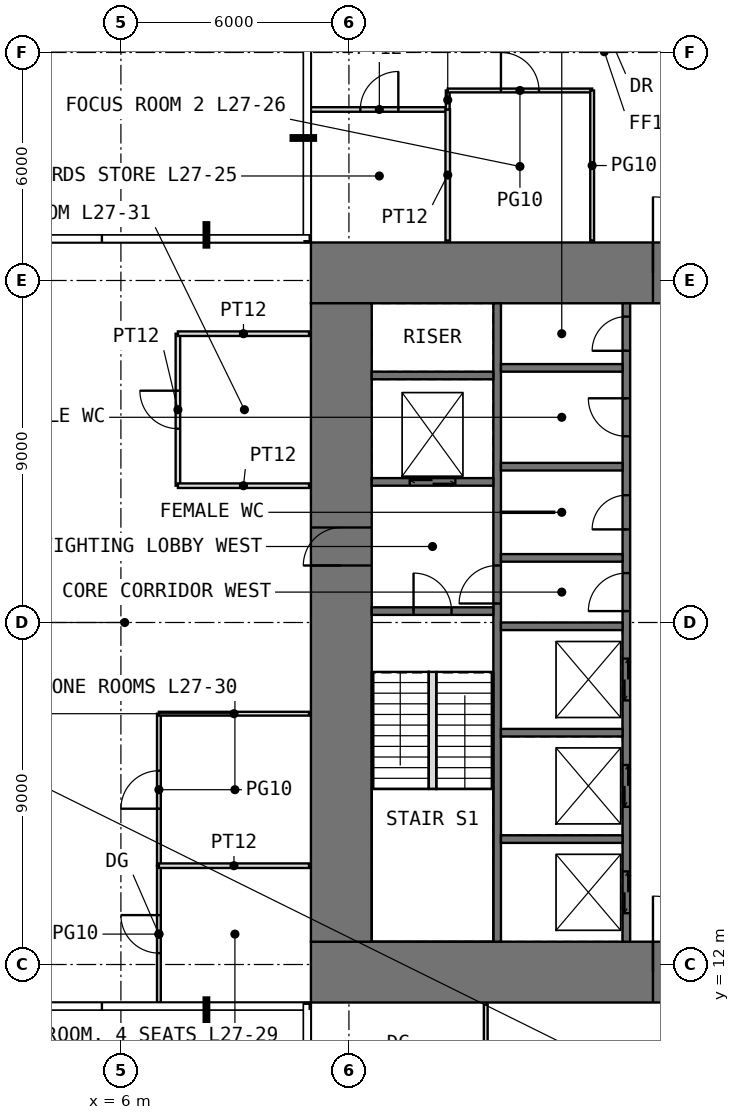
"""IFC4 building model, lengths in metres.
Left out: names, types, materials, properties, quantities, classifications, styles, units other than length and angle.
Written with IfcOpenShell. Run it as: python <this file> out.ifc"""

import sys

from ifc_helpers import new_model, si_unit, direction, frame, frame_2d, origin, place, context, subcontext, project, spatial, rectangle, extrude, element, fill, save


model = new_model("IFC4")
c1 = context("Model", 3, precision=1e-05, world=origin(), true_north=direction((0.0, 1.0)))
c2 = subcontext(c1, "Body", "Model", "MODEL_VIEW")
j1 = project(units=[si_unit("LENGTHUNIT", "METRE"), si_unit("PLANEANGLEUNIT", "RADIAN")], contexts=[c1])
p1 = place(None, origin())
s1 = spatial("IfcSite", under=j1, at=p1, CompositionType="ELEMENT")
p2 = place(p1, origin())
s2 = spatial("IfcBuilding", under=s1, at=p2, CompositionType="ELEMENT")
p3 = place(p2, frame((0.0, 0.0, 116.5)))
s3 = spatial("IfcBuildingStorey", under=s2, at=p3, CompositionType="ELEMENT", Elevation=116.5)
p4 = place(p3, frame((11.0, 11.8, -0.05), z_axis=(0.0, 0.0, 1.0), x_axis=(1.0, 0.0, 0.0)))
e1 = element("IfcWall", 1, at=p4, inside=s3, PredefinedType="SHEAR", context=c2, shape_type="SweptSolid", body=[
    extrude(rectangle(XDim=20.0, YDim=1.6, at=frame_2d((10.0, 0.0))), origin(), (0.0, 0.0, 1.0), 4.0),
])
p5 = place(p4, frame((9.0, 0.0, 0.05)))
e2 = element("IfcOpeningElement", 2, at=p5, cuts=e1, PredefinedType="OPENING", context=c2, shape_type="SweptSolid", body=[
    extrude(rectangle(XDim=2.0, YDim=2.2, at=frame_2d((1.0, 1.1))), frame((0.0, 0.81, 0.0), z_axis=(0.0, -1.0, 0.0), x_axis=(1.0, 0.0, 0.0)), (0.0, 0.0, 1.0), 1.62),
])
p6 = place(p3, frame((11.0, 30.2, -0.05), z_axis=(0.0, 0.0, 1.0), x_axis=(1.0, 0.0, 0.0)))
e3 = element("IfcWall", 3, at=p6, inside=s3, PredefinedType="SHEAR", context=c2, shape_type="SweptSolid", body=[
    extrude(rectangle(XDim=20.0, YDim=1.6, at=frame_2d((10.0, 0.0))), origin(), (0.0, 0.0, 1.0), 4.0),
])
p7 = place(p6, frame((9.0, 0.0, 0.05)))
e4 = element("IfcOpeningElement", 4, at=p7, cuts=e3, PredefinedType="OPENING", context=c2, shape_type="SweptSolid", body=[
    extrude(rectangle(XDim=2.0, YDim=2.2, at=frame_2d((1.0, 1.1))), frame((0.0, 0.81, 0.0), z_axis=(0.0, -1.0, 0.0), x_axis=(1.0, 0.0, 0.0)), (0.0, 0.0, 1.0), 1.62),
])
p8 = place(p3, frame((11.8, 12.6, -0.05), z_axis=(0.0, 0.0, 1.0), x_axis=(0.0, 1.0, 0.0)))
e5 = element("IfcWall", 5, at=p8, inside=s3, PredefinedType="SHEAR", context=c2, shape_type="SweptSolid", body=[
    extrude(rectangle(XDim=16.8, YDim=1.6, at=frame_2d((8.4, 0.0))), origin(), (0.0, 0.0, 1.0), 4.0),
])
p9 = place(p8, frame((9.9, 0.0, 0.05)))
e6 = element("IfcOpeningElement", 6, at=p9, cuts=e5, PredefinedType="OPENING", context=c2, shape_type="SweptSolid", body=[
    extrude(rectangle(XDim=1.0, YDim=2.2, at=frame_2d((0.5, 1.1))), frame((0.0, 0.81, 0.0), z_axis=(0.0, -1.0, 0.0), x_axis=(1.0, 0.0, 0.0)), (0.0, 0.0, 1.0), 1.62),
])
p10 = place(p3, frame((15.9, 12.6, -0.05), z_axis=(0.0, 0.0, 1.0), x_axis=(0.0, 1.0, 0.0)))
e7 = element("IfcWall", 7, at=p10, inside=s3, PredefinedType="SHEAR", context=c2, shape_type="SweptSolid", body=[
    extrude(rectangle(XDim=16.8, YDim=0.2, at=frame_2d((8.4, 0.0))), origin(), (0.0, 0.0, 1.0), 4.0),
])
p11 = place(p10, frame((8.9, 0.0, 0.05)))
e8 = element("IfcOpeningElement", 8, at=p11, cuts=e7, PredefinedType="OPENING", context=c2, shape_type="SweptSolid", body=[
    extrude(rectangle(XDim=1.0, YDim=2.2, at=frame_2d((0.5, 1.1))), frame((0.0, 0.11, 0.0), z_axis=(0.0, -1.0, 0.0), x_axis=(1.0, 0.0, 0.0)), (0.0, 0.0, 1.0), 0.22),
])
p12 = place(p3, frame((19.3, 12.6, -0.05), z_axis=(0.0, 0.0, 1.0), x_axis=(0.0, 1.0, 0.0)))
e9 = element("IfcWall", 9, at=p12, inside=s3, PredefinedType="SHEAR", context=c2, shape_type="SweptSolid", body=[
    extrude(rectangle(XDim=16.8, YDim=0.2, at=frame_2d((8.4, 0.0))), origin(), (0.0, 0.0, 1.0), 4.0),
])
p13 = place(p12, frame((8.7, 0.0, 0.05)))
e10 = element("IfcOpeningElement", 10, at=p13, cuts=e9, PredefinedType="OPENING", context=c2, shape_type="SweptSolid", body=[
    extrude(rectangle(XDim=1.0, YDim=2.2, at=frame_2d((0.5, 1.1))), frame((0.0, 0.11, 0.0), z_axis=(0.0, -1.0, 0.0), x_axis=(1.0, 0.0, 0.0)), (0.0, 0.0, 1.0), 0.22),
])
p14 = place(p12, frame((10.85, 0.0, 0.05)))
e11 = element("IfcOpeningElement", 11, at=p14, cuts=e9, PredefinedType="OPENING", context=c2, shape_type="SweptSolid", body=[
    extrude(rectangle(XDim=0.9, YDim=2.2, at=frame_2d((0.45, 1.1))), frame((0.0, 0.11, 0.0), z_axis=(0.0, -1.0, 0.0), x_axis=(1.0, 0.0, 0.0)), (0.0, 0.0, 1.0), 0.22),
])
p15 = place(p12, frame((13.3, 0.0, 0.05)))
e12 = element("IfcOpeningElement", 12, at=p15, cuts=e9, PredefinedType="OPENING", context=c2, shape_type="SweptSolid", body=[
    extrude(rectangle(XDim=1.0, YDim=2.2, at=frame_2d((0.5, 1.1))), frame((0.0, 0.11, 0.0), z_axis=(0.0, -1.0, 0.0), x_axis=(1.0, 0.0, 0.0)), (0.0, 0.0, 1.0), 0.22),
])
p16 = place(p12, frame((15.55, 0.0, 0.05)))
e13 = element("IfcOpeningElement", 13, at=p16, cuts=e9, PredefinedType="OPENING", context=c2, shape_type="SweptSolid", body=[
    extrude(rectangle(XDim=0.9, YDim=2.2, at=frame_2d((0.45, 1.1))), frame((0.0, 0.11, 0.0), z_axis=(0.0, -1.0, 0.0), x_axis=(1.0, 0.0, 0.0)), (0.0, 0.0, 1.0), 0.22),
])
p17 = place(p12, frame((0.75, 0.0, 0.05)))
e14 = element("IfcOpeningElement", 14, at=p17, cuts=e9, PredefinedType="OPENING", context=c2, shape_type="SweptSolid", body=[
    extrude(rectangle(XDim=1.1, YDim=2.2, at=frame_2d((0.55, 1.1))), frame((0.0, 0.11, 0.0), z_axis=(0.0, -1.0, 0.0), x_axis=(1.0, 0.0, 0.0)), (0.0, 0.0, 1.0), 0.22),
])
p18 = place(p12, frame((3.55, 0.0, 0.05)))
e15 = element("IfcOpeningElement", 15, at=p18, cuts=e9, PredefinedType="OPENING", context=c2, shape_type="SweptSolid", body=[
    extrude(rectangle(XDim=1.1, YDim=2.2, at=frame_2d((0.55, 1.1))), frame((0.0, 0.11, 0.0), z_axis=(0.0, -1.0, 0.0), x_axis=(1.0, 0.0, 0.0)), (0.0, 0.0, 1.0), 0.22),
])
p19 = place(p12, frame((6.35, 0.0, 0.05)))
e16 = element("IfcOpeningElement", 16, at=p19, cuts=e9, PredefinedType="OPENING", context=c2, shape_type="SweptSolid", body=[
    extrude(rectangle(XDim=1.1, YDim=2.2, at=frame_2d((0.55, 1.1))), frame((0.0, 0.11, 0.0), z_axis=(0.0, -1.0, 0.0), x_axis=(1.0, 0.0, 0.0)), (0.0, 0.0, 1.0), 0.22),
])
p20 = place(p3, frame((12.6, 21.3, -0.05), z_axis=(0.0, 0.0, 1.0), x_axis=(1.0, 0.0, 0.0)))
e17 = element("IfcWall", 17, at=p20, inside=s3, PredefinedType="SHEAR", context=c2, shape_type="SweptSolid", body=[
    extrude(rectangle(XDim=3.2, YDim=0.2, at=frame_2d((1.6, 0.0))), origin(), (0.0, 0.0, 1.0), 4.0),
])
p21 = place(p20, frame((1.1, 0.0, 0.05)))
e18 = element("IfcOpeningElement", 18, at=p21, cuts=e17, PredefinedType="OPENING", context=c2, shape_type="SweptSolid", body=[
    extrude(rectangle(XDim=1.0, YDim=2.2, at=frame_2d((0.5, 1.1))), frame((0.0, 0.11, 0.0), z_axis=(0.0, -1.0, 0.0), x_axis=(1.0, 0.0, 0.0)), (0.0, 0.0, 1.0), 0.22),
])
p22 = place(p3, frame((12.6, 24.7, -0.05), z_axis=(0.0, 0.0, 1.0), x_axis=(1.0, 0.0, 0.0)))
e19 = element("IfcWall", 19, at=p22, inside=s3, PredefinedType="SHEAR", context=c2, shape_type="SweptSolid", body=[
    extrude(rectangle(XDim=3.2, YDim=0.2, at=frame_2d((1.6, 0.0))), origin(), (0.0, 0.0, 1.0), 4.0),
])
p23 = place(p22, frame((1.0, 0.0, 0.05)))
e20 = element("IfcOpeningElement", 20, at=p23, cuts=e19, PredefinedType="OPENING", context=c2, shape_type="SweptSolid", body=[
    extrude(rectangle(XDim=1.2, YDim=2.2, at=frame_2d((0.6, 1.1))), frame((0.0, 0.11, 0.0), z_axis=(0.0, -1.0, 0.0), x_axis=(1.0, 0.0, 0.0)), (0.0, 0.0, 1.0), 0.22),
])
for number, where, z_axis, x_axis in (
    (21, (12.6, 27.5, -0.05), (0.0, 0.0, 1.0), (1.0, 0.0, 0.0)),
    (22, (16.0, 15.3, -0.05), (0.0, 0.0, 1.0), (1.0, 0.0, 0.0)),
    (23, (16.0, 18.1, -0.05), (0.0, 0.0, 1.0), (1.0, 0.0, 0.0)),
    (24, (16.0, 20.9, -0.05), (0.0, 0.0, 1.0), (1.0, 0.0, 0.0)),
    (25, (16.0, 22.7, -0.05), (0.0, 0.0, 1.0), (1.0, 0.0, 0.0)),
    (26, (16.0, 25.1, -0.05), (0.0, 0.0, 1.0), (1.0, 0.0, 0.0)),
    (27, (16.0, 27.7, -0.05), (0.0, 0.0, 1.0), (1.0, 0.0, 0.0)),
):
    element("IfcWall", number, at=place(p3, frame(where, z_axis=z_axis, x_axis=x_axis)), inside=s3, PredefinedType="SHEAR", context=c2, shape_type="SweptSolid", body=[
        extrude(rectangle(XDim=3.2, YDim=0.2, at=frame_2d((1.6, 0.0))), origin(), (0.0, 0.0, 1.0), 4.0),
    ])
p24 = place(p3, frame((16.0, 23.9, 0.0), z_axis=(0.0, 0.0, 1.0), x_axis=(1.0, 0.0, 0.0)))
e28 = element("IfcWall", 28, at=p24, inside=s3, PredefinedType="PARTITIONING", context=c2, shape_type="SweptSolid", body=[
    extrude(rectangle(XDim=1.4, YDim=0.03, at=frame_2d((0.7, 0.0))), origin(), (0.0, 0.0, 1.0), 3.75),
])
p25 = place(p3, frame((7.0, 11.0, 0.0), z_axis=(0.0, 0.0, 1.0), x_axis=(0.0, 1.0, 0.0)))
e29 = element("IfcWall", 29, at=p25, inside=s3, PredefinedType="PARTITIONING", context=c2, shape_type="SweptSolid", body=[
    extrude(rectangle(XDim=3.6, YDim=0.1, at=frame_2d((1.8, 0.0))), origin(), (0.0, 0.0, 1.0), 3.75),
])
p26 = place(p25, frame((1.3, 0.0, 0.0)))
e30 = element("IfcOpeningElement", 30, at=p26, cuts=e29, PredefinedType="OPENING", context=c2, shape_type="SweptSolid", body=[
    extrude(rectangle(XDim=1.0, YDim=2.4, at=frame_2d((0.5, 1.2))), frame((0.0, 0.06, 0.0), z_axis=(0.0, -1.0, 0.0), x_axis=(1.0, 0.0, 0.0)), (0.0, 0.0, 1.0), 0.12),
])
p27 = place(p3, frame((7.0, 14.6, 0.0), z_axis=(0.0, 0.0, 1.0), x_axis=(0.0, 1.0, 0.0)))
e31 = element("IfcWall", 31, at=p27, inside=s3, PredefinedType="PARTITIONING", context=c2, shape_type="SweptSolid", body=[
    extrude(rectangle(XDim=4.0, YDim=0.1, at=frame_2d((2.0, 0.0))), origin(), (0.0, 0.0, 1.0), 3.75),
])
p28 = place(p27, frame((1.5, 0.0, 0.0)))
e32 = element("IfcOpeningElement", 32, at=p28, cuts=e31, PredefinedType="OPENING", context=c2, shape_type="SweptSolid", body=[
    extrude(rectangle(XDim=1.0, YDim=2.4, at=frame_2d((0.5, 1.2))), frame((0.0, 0.06, 0.0), z_axis=(0.0, -1.0, 0.0), x_axis=(1.0, 0.0, 0.0)), (0.0, 0.0, 1.0), 0.12),
])
p29 = place(p3, frame((7.0, 14.6, 0.0), z_axis=(0.0, 0.0, 1.0), x_axis=(1.0, 0.0, 0.0)))
e33 = element("IfcWall", 33, at=p29, inside=s3, PredefinedType="PARTITIONING", context=c2, shape_type="SweptSolid", body=[
    extrude(rectangle(XDim=3.95, YDim=0.12, at=frame_2d((1.975, 0.0))), origin(), (0.0, 0.0, 1.0), 3.75),
])
p30 = place(p3, frame((7.0, 18.6, 0.0), z_axis=(0.0, 0.0, 1.0), x_axis=(1.0, 0.0, 0.0)))
e34 = element("IfcWall", 34, at=p30, inside=s3, PredefinedType="PARTITIONING", context=c2, shape_type="SweptSolid", body=[
    extrude(rectangle(XDim=3.95, YDim=0.1, at=frame_2d((1.975, 0.0))), origin(), (0.0, 0.0, 1.0), 3.75),
])
p31 = place(p3, frame((7.5, 24.6, 0.0), z_axis=(0.0, 0.0, 1.0), x_axis=(0.0, 1.0, 0.0)))
e35 = element("IfcWall", 35, at=p31, inside=s3, PredefinedType="PARTITIONING", context=c2, shape_type="SweptSolid", body=[
    extrude(rectangle(XDim=4.0, YDim=0.12, at=frame_2d((2.0, 0.0))), origin(), (0.0, 0.0, 1.0), 3.75),
])
p32 = place(p31, frame((1.5, 0.0, 0.0)))
e36 = element("IfcOpeningElement", 36, at=p32, cuts=e35, PredefinedType="OPENING", context=c2, shape_type="SweptSolid", body=[
    extrude(rectangle(XDim=1.0, YDim=2.2, at=frame_2d((0.5, 1.1))), frame((0.0, 0.07, 0.0), z_axis=(0.0, -1.0, 0.0), x_axis=(1.0, 0.0, 0.0)), (0.0, 0.0, 1.0), 0.14),
])
for number, where, z_axis, x_axis in (
    (37, (7.5, 24.6, 0.0), (0.0, 0.0, 1.0), (1.0, 0.0, 0.0)),
    (38, (7.5, 28.6, 0.0), (0.0, 0.0, 1.0), (1.0, 0.0, 0.0)),
):
    element("IfcWall", number, at=place(p3, frame(where, z_axis=z_axis, x_axis=x_axis)), inside=s3, PredefinedType="PARTITIONING", context=c2, shape_type="SweptSolid", body=[
        extrude(rectangle(XDim=3.45, YDim=0.12, at=frame_2d((1.725, 0.0))), origin(), (0.0, 0.0, 1.0), 3.75),
    ])
p33 = place(p3, frame((11.0, 34.5, 0.0), z_axis=(0.0, 0.0, 1.0), x_axis=(1.0, 0.0, 0.0)))
e39 = element("IfcWall", 39, at=p33, inside=s3, PredefinedType="PARTITIONING", context=c2, shape_type="SweptSolid", body=[
    extrude(rectangle(XDim=3.6, YDim=0.12, at=frame_2d((1.8, 0.0))), origin(), (0.0, 0.0, 1.0), 3.75),
])
p34 = place(p33, frame((1.3, 0.0, 0.0)))
e40 = element("IfcOpeningElement", 40, at=p34, cuts=e39, PredefinedType="OPENING", context=c2, shape_type="SweptSolid", body=[
    extrude(rectangle(XDim=1.0, YDim=2.2, at=frame_2d((0.5, 1.1))), frame((0.0, 0.07, 0.0), z_axis=(0.0, -1.0, 0.0), x_axis=(1.0, 0.0, 0.0)), (0.0, 0.0, 1.0), 0.14),
])
p35 = place(p3, frame((14.6, 31.05, 0.0), z_axis=(0.0, 0.0, 1.0), x_axis=(0.0, 1.0, 0.0)))
e41 = element("IfcWall", 41, at=p35, inside=s3, PredefinedType="PARTITIONING", context=c2, shape_type="SweptSolid", body=[
    extrude(rectangle(XDim=3.45, YDim=0.12, at=frame_2d((1.725, 0.0))), origin(), (0.0, 0.0, 1.0), 3.75),
])
p36 = place(p3, frame((14.6, 34.5, 0.0), z_axis=(0.0, 0.0, 1.0), x_axis=(0.0, 1.0, 0.0)))
e42 = element("IfcWall", 42, at=p36, inside=s3, PredefinedType="PARTITIONING", context=c2, shape_type="SweptSolid", body=[
    extrude(rectangle(XDim=0.5, YDim=0.1, at=frame_2d((0.25, 0.0))), origin(), (0.0, 0.0, 1.0), 3.75),
])
p37 = place(p3, frame((14.6, 35.0, 0.0), z_axis=(0.0, 0.0, 1.0), x_axis=(1.0, 0.0, 0.0)))
e43 = element("IfcWall", 43, at=p37, inside=s3, PredefinedType="PARTITIONING", context=c2, shape_type="SweptSolid", body=[
    extrude(rectangle(XDim=3.8, YDim=0.1, at=frame_2d((1.9, 0.0))), origin(), (0.0, 0.0, 1.0), 3.75),
])
p38 = place(p37, frame((1.4, 0.0, 0.0)))
e44 = element("IfcOpeningElement", 44, at=p38, cuts=e43, PredefinedType="OPENING", context=c2, shape_type="SweptSolid", body=[
    extrude(rectangle(XDim=1.0, YDim=2.4, at=frame_2d((0.5, 1.2))), frame((0.0, 0.06, 0.0), z_axis=(0.0, -1.0, 0.0), x_axis=(1.0, 0.0, 0.0)), (0.0, 0.0, 1.0), 0.12),
])
for number, where, z_axis, x_axis in (
    (45, (15.6, 7.0, 0.0), (0.0, 0.0, 1.0), (0.0, 1.0, 0.0)),
    (46, (18.4, 31.05, 0.0), (0.0, 0.0, 1.0), (0.0, 1.0, 0.0)),
):
    element("IfcWall", number, at=place(p3, frame(where, z_axis=z_axis, x_axis=x_axis)), inside=s3, PredefinedType="PARTITIONING", context=c2, shape_type="SweptSolid", body=[
        extrude(rectangle(XDim=3.95, YDim=0.1, at=frame_2d((1.975, 0.0))), origin(), (0.0, 0.0, 1.0), 3.75),
    ])
p39 = place(p3, frame((14.2, 16.62, 0.0), z_axis=(0.0, 0.0, 1.0), x_axis=(0.0, 1.0, 0.0)))
e47 = element("IfcWall", 47, at=p39, inside=s3, PredefinedType="PARTITIONING", context=c2, shape_type="SweptSolid", body=[
    extrude(rectangle(XDim=3.08, YDim=0.2, at=frame_2d((1.54, 0.0))), origin(), (0.0, 0.0, 1.0), 4.0),
])
p40 = place(p5, origin())
e48 = element("IfcDoor", 48, at=p40, inside=s3, OperationType="DOUBLE_DOOR_SINGLE_SWING", PredefinedType="DOOR", context=c2, shape_type="SweptSolid", body=[
    extrude(rectangle(XDim=2.0, YDim=2.2, at=frame_2d((1.0, 1.1))), frame((0.0, 0.025, 0.0), z_axis=(0.0, -1.0, 0.0), x_axis=(1.0, 0.0, 0.0)), (0.0, 0.0, 1.0), 0.05),
])
fill(e2, e48)
p41 = place(p7, origin())
e49 = element("IfcDoor", 49, at=p41, inside=s3, OperationType="DOUBLE_DOOR_SINGLE_SWING", PredefinedType="DOOR", context=c2, shape_type="SweptSolid", body=[
    extrude(rectangle(XDim=2.0, YDim=2.2, at=frame_2d((1.0, 1.1))), frame((0.0, 0.025, 0.0), z_axis=(0.0, -1.0, 0.0), x_axis=(1.0, 0.0, 0.0)), (0.0, 0.0, 1.0), 0.05),
])
fill(e4, e49)
p42 = place(p9, origin())
e50 = element("IfcDoor", 50, at=p42, inside=s3, OperationType="SINGLE_SWING_LEFT", PredefinedType="DOOR", context=c2, shape_type="SweptSolid", body=[
    extrude(rectangle(XDim=1.0, YDim=2.2, at=frame_2d((0.5, 1.1))), frame((0.0, 0.025, 0.0), z_axis=(0.0, -1.0, 0.0), x_axis=(1.0, 0.0, 0.0)), (0.0, 0.0, 1.0), 0.05),
])
fill(e6, e50)
p43 = place(p21, origin())
e51 = element("IfcDoor", 51, at=p43, inside=s3, OperationType="SINGLE_SWING_LEFT", PredefinedType="DOOR", context=c2, shape_type="SweptSolid", body=[
    extrude(rectangle(XDim=1.0, YDim=2.2, at=frame_2d((0.5, 1.1))), frame((0.0, 0.025, 0.0), z_axis=(0.0, -1.0, 0.0), x_axis=(1.0, 0.0, 0.0)), (0.0, 0.0, 1.0), 0.05),
])
fill(e18, e51)
p44 = place(p11, origin())
e52 = element("IfcDoor", 52, at=p44, inside=s3, OperationType="SINGLE_SWING_LEFT", PredefinedType="DOOR", context=c2, shape_type="SweptSolid", body=[
    extrude(rectangle(XDim=1.0, YDim=2.2, at=frame_2d((0.5, 1.1))), frame((0.0, 0.025, 0.0), z_axis=(0.0, -1.0, 0.0), x_axis=(1.0, 0.0, 0.0)), (0.0, 0.0, 1.0), 0.05),
])
fill(e8, e52)
p45 = place(p13, origin())
e53 = element("IfcDoor", 53, at=p45, inside=s3, OperationType="SINGLE_SWING_LEFT", PredefinedType="DOOR", context=c2, shape_type="SweptSolid", body=[
    extrude(rectangle(XDim=1.0, YDim=2.2, at=frame_2d((0.5, 1.1))), frame((0.0, 0.025, 0.0), z_axis=(0.0, -1.0, 0.0), x_axis=(1.0, 0.0, 0.0)), (0.0, 0.0, 1.0), 0.05),
])
fill(e10, e53)
p46 = place(p14, origin())
e54 = element("IfcDoor", 54, at=p46, inside=s3, OperationType="SINGLE_SWING_LEFT", PredefinedType="DOOR", context=c2, shape_type="SweptSolid", body=[
    extrude(rectangle(XDim=0.9, YDim=2.2, at=frame_2d((0.45, 1.1))), frame((0.0, 0.025, 0.0), z_axis=(0.0, -1.0, 0.0), x_axis=(1.0, 0.0, 0.0)), (0.0, 0.0, 1.0), 0.05),
])
fill(e11, e54)
p47 = place(p15, origin())
e55 = element("IfcDoor", 55, at=p47, inside=s3, OperationType="SINGLE_SWING_RIGHT", PredefinedType="DOOR", context=c2, shape_type="SweptSolid", body=[
    extrude(rectangle(XDim=1.0, YDim=2.2, at=frame_2d((0.5, 1.1))), frame((0.0, 0.025, 0.0), z_axis=(0.0, -1.0, 0.0), x_axis=(1.0, 0.0, 0.0)), (0.0, 0.0, 1.0), 0.05),
])
fill(e12, e55)
p48 = place(p16, origin())
e56 = element("IfcDoor", 56, at=p48, inside=s3, OperationType="SINGLE_SWING_LEFT", PredefinedType="DOOR", context=c2, shape_type="SweptSolid", body=[
    extrude(rectangle(XDim=0.9, YDim=2.2, at=frame_2d((0.45, 1.1))), frame((0.0, 0.025, 0.0), z_axis=(0.0, -1.0, 0.0), x_axis=(1.0, 0.0, 0.0)), (0.0, 0.0, 1.0), 0.05),
])
fill(e13, e56)
p49 = place(p34, origin())
e57 = element("IfcDoor", 57, at=p49, inside=s3, OperationType="SINGLE_SWING_RIGHT", PredefinedType="DOOR", context=c2, shape_type="SweptSolid", body=[
    extrude(rectangle(XDim=1.0, YDim=2.2, at=frame_2d((0.5, 1.1))), frame((0.0, 0.025, 0.0), z_axis=(0.0, -1.0, 0.0), x_axis=(1.0, 0.0, 0.0)), (0.0, 0.0, 1.0), 0.05),
])
fill(e40, e57)
p50 = place(p38, origin())
e58 = element("IfcDoor", 58, at=p50, inside=s3, OperationType="SINGLE_SWING_LEFT", PredefinedType="DOOR", context=c2, shape_type="SweptSolid", body=[
    extrude(rectangle(XDim=1.0, YDim=2.4, at=frame_2d((0.5, 1.2))), frame((0.0, 0.025, 0.0), z_axis=(0.0, -1.0, 0.0), x_axis=(1.0, 0.0, 0.0)), (0.0, 0.0, 1.0), 0.05),
])
fill(e44, e58)
p51 = place(p26, origin())
e59 = element("IfcDoor", 59, at=p51, inside=s3, OperationType="SINGLE_SWING_RIGHT", PredefinedType="DOOR", context=c2, shape_type="SweptSolid", body=[
    extrude(rectangle(XDim=1.0, YDim=2.4, at=frame_2d((0.5, 1.2))), frame((0.0, 0.025, 0.0), z_axis=(0.0, -1.0, 0.0), x_axis=(1.0, 0.0, 0.0)), (0.0, 0.0, 1.0), 0.05),
])
fill(e30, e59)
p52 = place(p28, origin())
e60 = element("IfcDoor", 60, at=p52, inside=s3, OperationType="SINGLE_SWING_LEFT", PredefinedType="DOOR", context=c2, shape_type="SweptSolid", body=[
    extrude(rectangle(XDim=1.0, YDim=2.4, at=frame_2d((0.5, 1.2))), frame((0.0, 0.025, 0.0), z_axis=(0.0, -1.0, 0.0), x_axis=(1.0, 0.0, 0.0)), (0.0, 0.0, 1.0), 0.05),
])
fill(e32, e60)
p53 = place(p32, origin())
e61 = element("IfcDoor", 61, at=p53, inside=s3, OperationType="SINGLE_SWING_RIGHT", PredefinedType="DOOR", context=c2, shape_type="SweptSolid", body=[
    extrude(rectangle(XDim=1.0, YDim=2.2, at=frame_2d((0.5, 1.1))), frame((0.0, 0.025, 0.0), z_axis=(0.0, -1.0, 0.0), x_axis=(1.0, 0.0, 0.0)), (0.0, 0.0, 1.0), 0.05),
])
fill(e36, e61)
p54 = place(p17, origin())
e62 = element("IfcDoor", 62, at=p54, inside=s3, OperationType="DOUBLE_DOOR_SLIDING", PredefinedType="DOOR", context=c2, shape_type="SweptSolid", body=[
    extrude(rectangle(XDim=1.1, YDim=2.2, at=frame_2d((0.55, 1.1))), frame((0.0, 0.025, 0.0), z_axis=(0.0, -1.0, 0.0), x_axis=(1.0, 0.0, 0.0)), (0.0, 0.0, 1.0), 0.05),
])
fill(e14, e62)
p55 = place(p18, origin())
e63 = element("IfcDoor", 63, at=p55, inside=s3, OperationType="DOUBLE_DOOR_SLIDING", PredefinedType="DOOR", context=c2, shape_type="SweptSolid", body=[
    extrude(rectangle(XDim=1.1, YDim=2.2, at=frame_2d((0.55, 1.1))), frame((0.0, 0.025, 0.0), z_axis=(0.0, -1.0, 0.0), x_axis=(1.0, 0.0, 0.0)), (0.0, 0.0, 1.0), 0.05),
])
fill(e15, e63)
p56 = place(p19, origin())
e64 = element("IfcDoor", 64, at=p56, inside=s3, OperationType="DOUBLE_DOOR_SLIDING", PredefinedType="DOOR", context=c2, shape_type="SweptSolid", body=[
    extrude(rectangle(XDim=1.1, YDim=2.2, at=frame_2d((0.55, 1.1))), frame((0.0, 0.025, 0.0), z_axis=(0.0, -1.0, 0.0), x_axis=(1.0, 0.0, 0.0)), (0.0, 0.0, 1.0), 0.05),
])
fill(e16, e64)
p57 = place(p23, origin())
e65 = element("IfcDoor", 65, at=p57, inside=s3, OperationType="DOUBLE_DOOR_SLIDING", PredefinedType="DOOR", context=c2, shape_type="SweptSolid", body=[
    extrude(rectangle(XDim=1.2, YDim=2.2, at=frame_2d((0.6, 1.1))), frame((0.0, 0.025, 0.0), z_axis=(0.0, -1.0, 0.0), x_axis=(1.0, 0.0, 0.0)), (0.0, 0.0, 1.0), 0.05),
])
fill(e20, e65)
save(model, sys.argv[1])
